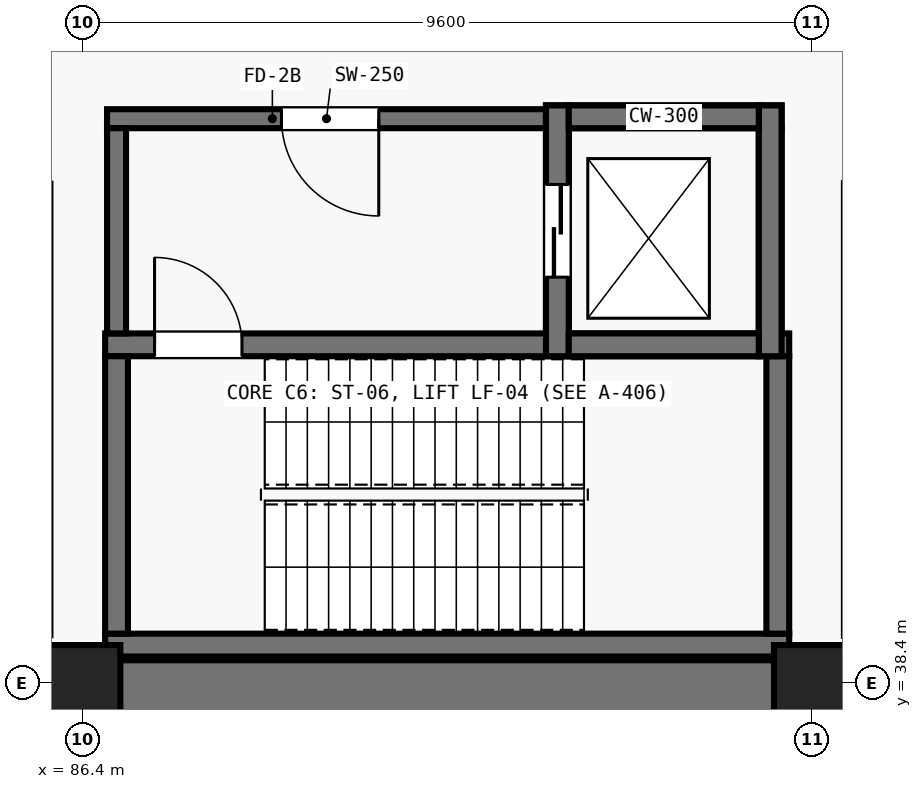
"""IFC4 building model, lengths in metres.
Left out: names, types, materials, properties, quantities, classifications, styles, units other than length and angle.
Written with IfcOpenShell. Run it as: python <this file> out.ifc"""

import sys

from ifc_helpers import new_model, si_unit, direction, frame, frame_2d, origin, origin_2d, place, context, subcontext, project, spatial, rectangle, extrude, element, fill, save


model = new_model("IFC4")
c1 = context("Model", 3, precision=1e-05, world=origin(), true_north=direction((0.0, 1.0)))
c2 = subcontext(c1, "Body", "Model", "MODEL_VIEW")
j1 = project(units=[si_unit("LENGTHUNIT", "METRE"), si_unit("PLANEANGLEUNIT", "RADIAN")], contexts=[c1])
p1 = place(None, origin())
s1 = spatial("IfcSite", under=j1, at=p1, CompositionType="ELEMENT")
p2 = place(p1, origin())
s2 = spatial("IfcBuilding", under=s1, at=p2, CompositionType="ELEMENT")
p3 = place(p2, frame((0.0, 0.0, -10.8)))
s3 = spatial("IfcBuildingStorey", under=s2, at=p3, CompositionType="ELEMENT", Elevation=-10.8)
p4 = place(p3, frame((153.7, 38.3, 0.0), z_axis=(0.0, 0.0, 1.0), x_axis=(-1.0, 0.0, 0.0)))
e1 = element("IfcWall", 1, at=p4, inside=s3, PredefinedType="SOLIDWALL", context=c2, shape_type="SweptSolid", body=[
    extrude(rectangle(XDim=96.0, YDim=0.8, at=frame_2d((48.0, 0.0))), origin(), (0.0, 0.0, 1.0), 5.05),
])
for number, where, z_axis, x_axis in (
    (2, (86.4, 38.4, 0.0), (0.0, 0.0, 1.0), (1.0, 0.0, 0.0)),
    (3, (96.0, 38.4, 0.0), (0.0, 0.0, 1.0), (1.0, 0.0, 0.0)),
):
    element("IfcColumn", number, at=place(p3, frame(where, z_axis=z_axis, x_axis=x_axis)), inside=s3, PredefinedType="COLUMN", context=c2, shape_type="SweptSolid", body=[
        extrude(rectangle(XDim=1.0, YDim=1.0, at=origin_2d()), origin(), (0.0, 0.0, 1.0), 5.05),
    ])
p5 = place(p3, frame((86.7, 38.9, 0.0), z_axis=(0.0, 0.0, 1.0), x_axis=(1.0, 0.0, 0.0)))
e4 = element("IfcWall", 4, at=p5, inside=s3, PredefinedType="SHEAR", context=c2, shape_type="SweptSolid", body=[
    extrude(rectangle(XDim=9.0, YDim=0.3, at=frame_2d((4.5, 0.0))), origin(), (0.0, 0.0, 1.0), 5.05),
])
p6 = place(p3, frame((95.7, 42.85, 0.0), z_axis=(0.0, 0.0, 1.0), x_axis=(-1.0, 0.0, 0.0)))
e5 = element("IfcWall", 5, at=p6, inside=s3, PredefinedType="SHEAR", context=c2, shape_type="SweptSolid", body=[
    extrude(rectangle(XDim=9.0, YDim=0.3, at=frame_2d((4.5, 0.0))), origin(), (0.0, 0.0, 1.0), 5.05),
])
p7 = place(p6, frame((7.2, 0.0, 0.0)))
e6 = element("IfcOpeningElement", 6, at=p7, cuts=e5, PredefinedType="OPENING", context=c2, shape_type="SweptSolid", body=[
    extrude(rectangle(XDim=1.15, YDim=2.15, at=frame_2d((0.575, 1.075))), frame((0.0, 0.16, 0.0), z_axis=(0.0, -1.0, 0.0), x_axis=(1.0, 0.0, 0.0)), (0.0, 0.0, 1.0), 0.32),
])
for number, where, z_axis, x_axis in (
    (7, (86.85, 39.05, 0.0), (0.0, 0.0, 1.0), (0.0, 1.0, 0.0)),
    (8, (95.55, 42.7, 0.0), (0.0, 0.0, 1.0), (0.0, -1.0, 0.0)),
):
    element("IfcWall", number, at=place(p3, frame(where, z_axis=z_axis, x_axis=x_axis)), inside=s3, PredefinedType="SHEAR", context=c2, shape_type="SweptSolid", body=[
        extrude(rectangle(XDim=3.65, YDim=0.3, at=frame_2d((1.825, 0.0))), origin(), (0.0, 0.0, 1.0), 5.05),
    ])
p8 = place(p3, frame((92.65, 45.7, 0.0), z_axis=(0.0, 0.0, 1.0), x_axis=(0.0, -1.0, 0.0)))
e9 = element("IfcWall", 9, at=p8, inside=s3, PredefinedType="SHEAR", context=c2, shape_type="SweptSolid", body=[
    extrude(rectangle(XDim=2.7, YDim=0.3, at=frame_2d((1.35, 0.0))), origin(), (0.0, 0.0, 1.0), 5.05),
])
p9 = place(p8, frame((0.74, 0.0, 0.0)))
e10 = element("IfcOpeningElement", 10, at=p9, cuts=e9, PredefinedType="OPENING", context=c2, shape_type="SweptSolid", body=[
    extrude(rectangle(XDim=1.22, YDim=2.15, at=frame_2d((0.61, 1.075))), frame((0.0, 0.16, 0.0), z_axis=(0.0, -1.0, 0.0), x_axis=(1.0, 0.0, 0.0)), (0.0, 0.0, 1.0), 0.32),
])
p10 = place(p3, frame((95.45, 43.0, 0.0), z_axis=(0.0, 0.0, 1.0), x_axis=(0.0, 1.0, 0.0)))
e11 = element("IfcWall", 11, at=p10, inside=s3, PredefinedType="SHEAR", context=c2, shape_type="SweptSolid", body=[
    extrude(rectangle(XDim=2.7, YDim=0.3, at=frame_2d((1.35, 0.0))), origin(), (0.0, 0.0, 1.0), 5.05),
])
p11 = place(p3, frame((92.5, 45.85, 0.0), z_axis=(0.0, 0.0, 1.0), x_axis=(1.0, 0.0, 0.0)))
e12 = element("IfcWall", 12, at=p11, inside=s3, PredefinedType="SHEAR", context=c2, shape_type="SweptSolid", body=[
    extrude(rectangle(XDim=3.1, YDim=0.3, at=frame_2d((1.55, 0.0))), origin(), (0.0, 0.0, 1.0), 5.05),
])
p12 = place(p3, frame((92.5, 45.825, 0.0), z_axis=(0.0, 0.0, 1.0), x_axis=(-1.0, 0.0, 0.0)))
e13 = element("IfcWall", 13, at=p12, inside=s3, PredefinedType="SHEAR", context=c2, shape_type="SweptSolid", body=[
    extrude(rectangle(XDim=5.775, YDim=0.25, at=frame_2d((2.887, 0.0))), origin(), (0.0, 0.0, 1.0), 5.05),
])
p13 = place(p12, frame((2.2, 0.0, 0.0)))
e14 = element("IfcOpeningElement", 14, at=p13, cuts=e13, PredefinedType="OPENING", context=c2, shape_type="SweptSolid", body=[
    extrude(rectangle(XDim=1.28, YDim=2.2, at=frame_2d((0.64, 1.1))), frame((0.0, 0.135, 0.0), z_axis=(0.0, -1.0, 0.0), x_axis=(1.0, 0.0, 0.0)), (0.0, 0.0, 1.0), 0.27),
])
p14 = place(p3, frame((86.85, 43.0, 0.0), z_axis=(0.0, 0.0, 1.0), x_axis=(0.0, 1.0, 0.0)))
e15 = element("IfcWall", 15, at=p14, inside=s3, PredefinedType="SHEAR", context=c2, shape_type="SweptSolid", body=[
    extrude(rectangle(XDim=2.7, YDim=0.25, at=frame_2d((1.35, 0.0))), origin(), (0.0, 0.0, 1.0), 5.05),
])
for number, where, z_axis, x_axis in (
    (16, (92.65, 42.7, -1.2), (0.0, 0.0, 1.0), (0.0, 1.0, 0.0)),
    (17, (95.45, 42.7, -1.2), (0.0, 0.0, 1.0), (0.0, 1.0, 0.0)),
):
    element("IfcWall", number, at=place(p3, frame(where, z_axis=z_axis, x_axis=x_axis)), inside=s3, PredefinedType="SHEAR", context=c2, shape_type="SweptSolid", body=[
        extrude(rectangle(XDim=3.3, YDim=0.3, at=frame_2d((1.65, 0.0))), origin(), (0.0, 0.0, 1.0), 0.32),
    ])
for number, where, z_axis, x_axis in (
    (18, (92.8, 42.85, -1.2), (0.0, 0.0, 1.0), (1.0, 0.0, 0.0)),
    (19, (92.8, 45.85, -1.2), (0.0, 0.0, 1.0), (1.0, 0.0, 0.0)),
):
    element("IfcWall", number, at=place(p3, frame(where, z_axis=z_axis, x_axis=x_axis)), inside=s3, PredefinedType="SHEAR", context=c2, shape_type="SweptSolid", body=[
        extrude(rectangle(XDim=2.5, YDim=0.3, at=frame_2d((1.25, 0.0))), origin(), (0.0, 0.0, 1.0), 0.32),
    ])
p15 = place(p7, frame((1.15, 0.0, 0.0), z_axis=(0.0, 0.0, 1.0), x_axis=(-1.0, 0.0, 0.0)))
e20 = element("IfcDoor", 20, at=p15, inside=s3, OperationType="SINGLE_SWING_RIGHT", PredefinedType="DOOR", context=c2, shape_type="SweptSolid", body=[
    extrude(rectangle(XDim=1.15, YDim=2.15, at=frame_2d((0.575, 1.075))), frame((0.0, 0.025, 0.0), z_axis=(0.0, -1.0, 0.0), x_axis=(1.0, 0.0, 0.0)), (0.0, 0.0, 1.0), 0.05),
])
fill(e6, e20)
p16 = place(p9, frame((1.22, 0.0, 0.0), z_axis=(0.0, 0.0, 1.0), x_axis=(-1.0, 0.0, 0.0)))
e21 = element("IfcDoor", 21, at=p16, inside=s3, OperationType="DOUBLE_DOOR_SLIDING", PredefinedType="DOOR", context=c2, shape_type="SweptSolid", body=[
    extrude(rectangle(XDim=1.22, YDim=2.15, at=frame_2d((0.61, 1.075))), frame((0.0, 0.025, 0.0), z_axis=(0.0, -1.0, 0.0), x_axis=(1.0, 0.0, 0.0)), (0.0, 0.0, 1.0), 0.05),
])
fill(e10, e21)
p17 = place(p13, origin())
e22 = element("IfcDoor", 22, at=p17, inside=s3, OperationType="SINGLE_SWING_LEFT", PredefinedType="DOOR", context=c2, shape_type="SweptSolid", body=[
    extrude(rectangle(XDim=1.28, YDim=2.2, at=frame_2d((0.64, 1.1))), frame((0.0, 0.025, 0.0), z_axis=(0.0, -1.0, 0.0), x_axis=(1.0, 0.0, 0.0)), (0.0, 0.0, 1.0), 0.05),
])
fill(e14, e22)
save(model, sys.argv[1])
